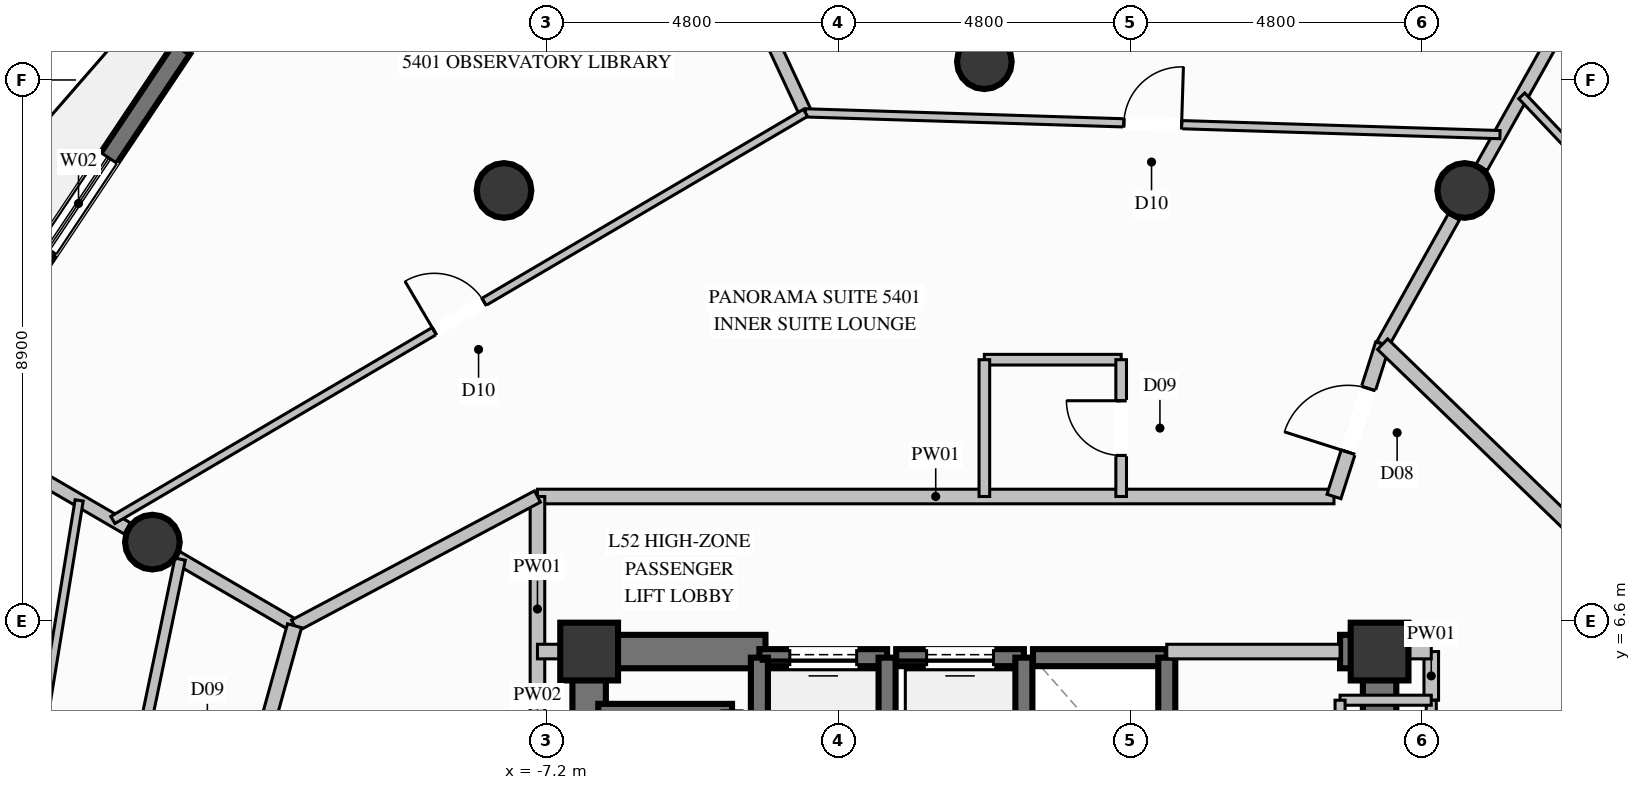
"""IFC4 building model, lengths in metres.
Left out: names, types, materials, properties, quantities, classifications, styles, units other than length and angle.
Written with IfcOpenShell. Run it as: python <this file> out.ifc"""

import sys

from ifc_helpers import new_model, si_unit, direction, frame, frame_2d, origin, origin_2d, place, context, subcontext, project, spatial, rectangle, circle, extrude, element, fill, save


model = new_model("IFC4")
c1 = context("Model", 3, precision=1e-05, world=origin(), true_north=direction((0.0, 1.0)))
c2 = subcontext(c1, "Body", "Model", "MODEL_VIEW")
j1 = project(units=[si_unit("LENGTHUNIT", "METRE"), si_unit("PLANEANGLEUNIT", "RADIAN")], contexts=[c1])
p1 = place(None, origin())
s1 = spatial("IfcSite", under=j1, at=p1, CompositionType="ELEMENT")
p2 = place(p1, origin())
s2 = spatial("IfcBuilding", under=s1, at=p2, CompositionType="ELEMENT")
p3 = place(p2, frame((0.0, 0.0, 202.0)))
s3 = spatial("IfcBuildingStorey", under=s2, at=p3, CompositionType="ELEMENT", Elevation=202.0)
for number, where, z_axis, x_axis in (
    (1, (6.5, 6.1, 0.0), (0.0, 0.0, 1.0), (1.0, 0.0, 0.0)),
    (2, (-6.5, 6.1, 0.0), (0.0, 0.0, 1.0), (1.0, 0.0, 0.0)),
):
    element("IfcColumn", number, at=place(p3, frame(where, z_axis=z_axis, x_axis=x_axis)), inside=s3, PredefinedType="COLUMN", context=c2, shape_type="SweptSolid", body=[
        extrude(rectangle(XDim=0.95, YDim=0.95, at=origin_2d()), origin(), (0.0, 0.0, 1.0), 3.6),
    ])
p4 = place(p3, frame((-6.225, 6.1, 0.0), z_axis=(0.0, 0.0, 1.0), x_axis=(1.0, 0.0, 0.0)))
e3 = element("IfcWall", 3, at=p4, inside=s3, PredefinedType="SHEAR", context=c2, shape_type="SweptSolid", body=[
    extrude(rectangle(XDim=2.625, YDim=0.55, at=frame_2d((1.312, 0.0))), origin(), (0.0, 0.0, 1.0), 3.6),
])
p5 = place(p3, frame((5.85, 6.1, 0.0), z_axis=(0.0, 0.0, 1.0), x_axis=(1.0, 0.0, 0.0)))
e4 = element("IfcWall", 4, at=p5, inside=s3, PredefinedType="SHEAR", context=c2, shape_type="SweptSolid", body=[
    extrude(rectangle(XDim=0.375, YDim=0.55, at=frame_2d((0.188, 0.0))), origin(), (0.0, 0.0, 1.0), 3.6),
])
p6 = place(p3, frame((-6.5, 2.35, 0.0), z_axis=(0.0, 0.0, 1.0), x_axis=(0.0, 1.0, 0.0)))
e5 = element("IfcWall", 5, at=p6, inside=s3, PredefinedType="SHEAR", context=c2, shape_type="SweptSolid", body=[
    extrude(rectangle(XDim=4.025, YDim=0.55, at=frame_2d((2.012, 0.0))), origin(), (0.0, 0.0, 1.0), 3.6),
])
p7 = place(p3, frame((6.5, 3.35, 0.0), z_axis=(0.0, 0.0, 1.0), x_axis=(0.0, 1.0, 0.0)))
e6 = element("IfcWall", 6, at=p7, inside=s3, PredefinedType="SHEAR", context=c2, shape_type="SweptSolid", body=[
    extrude(rectangle(XDim=3.025, YDim=0.55, at=frame_2d((1.512, 0.0))), origin(), (0.0, 0.0, 1.0), 3.6),
])
for number, where, z_axis, x_axis in (
    (7, (7.9, 13.683, 0.0), (0.0, 0.0, 1.0), (1.0, 0.0, 0.0)),
    (8, (0.0, 15.8, 0.0), (0.0, 0.0, 1.0), (1.0, 0.0, 0.0)),
    (9, (-7.9, 13.683, 0.0), (0.0, 0.0, 1.0), (1.0, 0.0, 0.0)),
    (10, (-13.683, 7.9, 0.0), (0.0, 0.0, 1.0), (1.0, 0.0, 0.0)),
):
    element("IfcColumn", number, at=place(p3, frame(where, z_axis=z_axis, x_axis=x_axis)), inside=s3, PredefinedType="COLUMN", context=c2, shape_type="SweptSolid", body=[
        extrude(circle(Radius=0.45, at=origin_2d()), origin(), (0.0, 0.0, 1.0), 3.6),
    ])
p8 = place(p3, frame((9.361, 18.229, 0.0), z_axis=(0.0, 0.0, 1.0), x_axis=(0.765961316102, -0.642886663601, 0.0)))
e11 = element("IfcWall", 11, at=p8, inside=s3, PredefinedType="SOLIDWALL", context=c2, shape_type="SweptSolid", body=[
    extrude(rectangle(XDim=6.637, YDim=0.32, at=frame_2d((3.319, 0.0))), origin(), (0.0, 0.0, 1.0), 3.36),
])
p9 = place(p8, frame((2.984, 0.0, 0.35)))
e12 = element("IfcOpeningElement", 12, at=p9, cuts=e11, PredefinedType="OPENING", context=c2, shape_type="SweptSolid", body=[
    extrude(rectangle(XDim=1.8, YDim=2.6, at=frame_2d((0.9, 1.3))), frame((0.0, 0.17, 0.0), z_axis=(0.0, -1.0, 0.0), x_axis=(1.0, 0.0, 0.0)), (0.0, 0.0, 1.0), 0.34),
])
p10 = place(p3, frame((-16.601, 10.92, 0.0), z_axis=(0.0, 0.0, 1.0), x_axis=(0.555517753524, 0.831504675585, 0.0)))
e13 = element("IfcWall", 13, at=p10, inside=s3, PredefinedType="SOLIDWALL", context=c2, shape_type="SweptSolid", body=[
    extrude(rectangle(XDim=6.131, YDim=0.32, at=frame_2d((3.066, 0.0))), origin(), (0.0, 0.0, 1.0), 3.36),
])
p11 = place(p10, frame((2.166, 0.0, 0.35)))
e14 = element("IfcOpeningElement", 14, at=p11, cuts=e13, PredefinedType="OPENING", context=c2, shape_type="SweptSolid", body=[
    extrude(rectangle(XDim=1.8, YDim=2.6, at=frame_2d((0.9, 1.3))), frame((0.0, 0.17, 0.0), z_axis=(0.0, -1.0, 0.0), x_axis=(1.0, 0.0, 0.0)), (0.0, 0.0, 1.0), 0.34),
])
p12 = place(p3, frame((-1.6, 6.0, 0.0), z_axis=(0.0, 0.0, 1.0), x_axis=(-1.0, 0.0, 0.0)))
e15 = element("IfcWall", 15, at=p12, inside=s3, PredefinedType="SOLIDWALL", context=c2, shape_type="SweptSolid", body=[
    extrude(rectangle(XDim=2.1, YDim=0.28, at=frame_2d((1.05, 0.0))), origin(), (0.0, 0.0, 1.0), 3.36),
])
p13 = place(p12, frame((0.5, 0.0, 0.0)))
e16 = element("IfcOpeningElement", 16, at=p13, cuts=e15, PredefinedType="OPENING", context=c2, shape_type="SweptSolid", body=[
    extrude(rectangle(XDim=1.1, YDim=2.2, at=frame_2d((0.55, 1.1))), frame((0.0, 0.15, 0.0), z_axis=(0.0, -1.0, 0.0), x_axis=(1.0, 0.0, 0.0)), (0.0, 0.0, 1.0), 0.3),
])
for number, where, z_axis, x_axis in (
    (17, (-3.7, 6.0, 0.0), (0.0, 0.0, 1.0), (0.0, -1.0, 0.0)),
    (18, (-1.6, 3.5, 0.0), (0.0, 0.0, 1.0), (0.0, 1.0, 0.0)),
):
    element("IfcWall", number, at=place(p3, frame(where, z_axis=z_axis, x_axis=x_axis)), inside=s3, PredefinedType="SOLIDWALL", context=c2, shape_type="SweptSolid", body=[
        extrude(rectangle(XDim=2.5, YDim=0.28, at=frame_2d((1.25, 0.0))), origin(), (0.0, 0.0, 1.0), 3.36),
    ])
p14 = place(p3, frame((0.65, 6.0, 0.0), z_axis=(0.0, 0.0, 1.0), x_axis=(-1.0, 0.0, 0.0)))
e19 = element("IfcWall", 19, at=p14, inside=s3, PredefinedType="SOLIDWALL", context=c2, shape_type="SweptSolid", body=[
    extrude(rectangle(XDim=2.1, YDim=0.28, at=frame_2d((1.05, 0.0))), origin(), (0.0, 0.0, 1.0), 3.36),
])
p15 = place(p14, frame((0.5, 0.0, 0.0)))
e20 = element("IfcOpeningElement", 20, at=p15, cuts=e19, PredefinedType="OPENING", context=c2, shape_type="SweptSolid", body=[
    extrude(rectangle(XDim=1.1, YDim=2.2, at=frame_2d((0.55, 1.1))), frame((0.0, 0.15, 0.0), z_axis=(0.0, -1.0, 0.0), x_axis=(1.0, 0.0, 0.0)), (0.0, 0.0, 1.0), 0.3),
])
p16 = place(p3, frame((0.65, 3.5, 0.0), z_axis=(0.0, 0.0, 1.0), x_axis=(0.0, 1.0, 0.0)))
e21 = element("IfcWall", 21, at=p16, inside=s3, PredefinedType="SOLIDWALL", context=c2, shape_type="SweptSolid", body=[
    extrude(rectangle(XDim=2.5, YDim=0.28, at=frame_2d((1.25, 0.0))), origin(), (0.0, 0.0, 1.0), 3.36),
])
p17 = place(p3, frame((3.0, 6.0, 0.0), z_axis=(0.0, 0.0, 1.0), x_axis=(-1.0, 0.0, 0.0)))
e22 = element("IfcWall", 22, at=p17, inside=s3, PredefinedType="SOLIDWALL", context=c2, shape_type="SweptSolid", body=[
    extrude(rectangle(XDim=2.2, YDim=0.28, at=frame_2d((1.1, 0.0))), origin(), (0.0, 0.0, 1.0), 3.36),
])
p18 = place(p3, frame((3.0, 3.5, 0.0), z_axis=(0.0, 0.0, 1.0), x_axis=(0.0, 1.0, 0.0)))
e23 = element("IfcWall", 23, at=p18, inside=s3, PredefinedType="SOLIDWALL", context=c2, shape_type="SweptSolid", body=[
    extrude(rectangle(XDim=2.5, YDim=0.28, at=frame_2d((1.25, 0.0))), origin(), (0.0, 0.0, 1.0), 3.36),
])
p19 = place(p3, frame((-4.15, 5.1, 0.0), z_axis=(0.0, 0.0, 1.0), x_axis=(-1.0, 0.0, 0.0)))
e24 = element("IfcWall", 24, at=p19, inside=s3, PredefinedType="SOLIDWALL", context=c2, shape_type="SweptSolid", body=[
    extrude(rectangle(XDim=2.2, YDim=0.28, at=frame_2d((1.1, 0.0))), origin(), (0.0, 0.0, 1.0), 3.36),
])
p20 = place(p3, frame((-7.35, 8.65, 0.0), z_axis=(0.0, 0.0, 1.0), x_axis=(1.0, 0.0, 0.0)))
e25 = element("IfcWall", 25, at=p20, inside=s3, PredefinedType="PARTITIONING", context=c2, shape_type="SweptSolid", body=[
    extrude(rectangle(XDim=13.1, YDim=0.24, at=frame_2d((6.55, 0.0))), origin(), (0.0, 0.0, 1.0), 3.36),
])
p21 = place(p3, frame((3.0, 6.1, 0.0), z_axis=(0.0, 0.0, 1.0), x_axis=(1.0, 0.0, 0.0)))
e26 = element("IfcWall", 26, at=p21, inside=s3, PredefinedType="PARTITIONING", context=c2, shape_type="SweptSolid", body=[
    extrude(rectangle(XDim=2.85, YDim=0.24, at=frame_2d((1.425, 0.0))), origin(), (0.0, 0.0, 1.0), 2.445),
])
p22 = place(p3, frame((7.35, 5.3, 0.0), z_axis=(0.0, 0.0, 1.0), x_axis=(0.0, 1.0, 0.0)))
e27 = element("IfcWall", 27, at=p22, inside=s3, PredefinedType="PARTITIONING", context=c2, shape_type="SweptSolid", body=[
    extrude(rectangle(XDim=0.8, YDim=0.24, at=frame_2d((0.4, 0.0))), origin(), (0.0, 0.0, 1.0), 2.445),
])
p23 = place(p3, frame((6.5, 6.1, 0.0), z_axis=(0.0, 0.0, 1.0), x_axis=(1.0, 0.0, 0.0)))
e28 = element("IfcWall", 28, at=p23, inside=s3, PredefinedType="PARTITIONING", context=c2, shape_type="SweptSolid", body=[
    extrude(rectangle(XDim=0.85, YDim=0.24, at=frame_2d((0.425, 0.0))), origin(), (0.0, 0.0, 1.0), 2.801),
])
p24 = place(p3, frame((-7.35, 4.95, 0.0), z_axis=(0.0, 0.0, 1.0), x_axis=(0.0, 1.0, 0.0)))
e29 = element("IfcWall", 29, at=p24, inside=s3, PredefinedType="PARTITIONING", context=c2, shape_type="SweptSolid", body=[
    extrude(rectangle(XDim=3.7, YDim=0.24, at=frame_2d((1.85, 0.0))), origin(), (0.0, 0.0, 1.0), 2.445),
])
p25 = place(p3, frame((-7.35, 6.1, 0.0), z_axis=(0.0, 0.0, 1.0), x_axis=(1.0, 0.0, 0.0)))
e30 = element("IfcWall", 30, at=p25, inside=s3, PredefinedType="PARTITIONING", context=c2, shape_type="SweptSolid", body=[
    extrude(rectangle(XDim=0.85, YDim=0.24, at=frame_2d((0.425, 0.0))), origin(), (0.0, 0.0, 1.0), 2.801),
])
p26 = place(p3, frame((7.35, 2.75, 0.0), z_axis=(0.0, 0.0, 1.0), x_axis=(0.0, 1.0, 0.0)))
e31 = element("IfcWall", 31, at=p26, inside=s3, PredefinedType="PARTITIONING", context=c2, shape_type="SweptSolid", body=[
    extrude(rectangle(XDim=2.55, YDim=0.165, at=frame_2d((1.275, 0.0))), origin(), (0.0, 0.0, 1.0), 3.36),
])
p27 = place(p26, frame((0.75, 0.0, 0.0)))
e32 = element("IfcOpeningElement", 32, at=p27, cuts=e31, PredefinedType="OPENING", context=c2, shape_type="SweptSolid", body=[
    extrude(rectangle(XDim=1.05, YDim=2.15, at=frame_2d((0.525, 1.075))), frame((0.0, 0.093, 0.0), z_axis=(0.0, -1.0, 0.0), x_axis=(1.0, 0.0, 0.0)), (0.0, 0.0, 1.0), 0.185),
])
p28 = place(p3, frame((7.35, 5.3, 0.0), z_axis=(0.0, 0.0, 1.0), x_axis=(-1.0, 0.0, 0.0)))
e33 = element("IfcWall", 33, at=p28, inside=s3, PredefinedType="PARTITIONING", context=c2, shape_type="SweptSolid", body=[
    extrude(rectangle(XDim=1.5, YDim=0.165, at=frame_2d((0.75, 0.0))), origin(), (0.0, 0.0, 1.0), 2.445),
])
p29 = place(p3, frame((5.85, 5.3, 0.0), z_axis=(0.0, 0.0, 1.0), x_axis=(0.0, -1.0, 0.0)))
e34 = element("IfcWall", 34, at=p29, inside=s3, PredefinedType="PARTITIONING", context=c2, shape_type="SweptSolid", body=[
    extrude(rectangle(XDim=2.55, YDim=0.165, at=frame_2d((1.275, 0.0))), origin(), (0.0, 0.0, 1.0), 2.445),
])
p30 = place(p3, frame((6.55, 11.155, 0.0), z_axis=(0.0, 0.0, 1.0), x_axis=(0.488535184748, 0.872544195593, 0.0)))
e35 = element("IfcWall", 35, at=p30, inside=s3, PredefinedType="PARTITIONING", context=c2, shape_type="SweptSolid", body=[
    extrude(rectangle(XDim=2.399, YDim=0.21, at=frame_2d((1.199, 0.0))), origin(), (0.0, 0.0, 1.0), 2.801),
])
p31 = place(p3, frame((8.178, 14.062, 0.0), z_axis=(0.0, 0.0, 1.0), x_axis=(0.488788123952, 0.87240252744, 0.0)))
e36 = element("IfcWall", 36, at=p31, inside=s3, PredefinedType="PARTITIONING", context=c2, shape_type="SweptSolid", body=[
    extrude(rectangle(XDim=3.983, YDim=0.21, at=frame_2d((1.992, 0.0))), origin(), (0.0, 0.0, 1.0), 3.36),
])
p32 = place(p3, frame((-11.345, 6.525, 0.0), z_axis=(0.0, 0.0, 1.0), x_axis=(-0.864228712324, 0.5030991282, 0.0)))
e37 = element("IfcWall", 37, at=p32, inside=s3, PredefinedType="PARTITIONING", context=c2, shape_type="SweptSolid", body=[
    extrude(rectangle(XDim=2.242, YDim=0.21, at=frame_2d((1.121, 0.0))), origin(), (0.0, 0.0, 1.0), 2.801),
])
p33 = place(p3, frame((-14.095, 8.125, 0.0), z_axis=(0.0, 0.0, 1.0), x_axis=(-0.864298015092, 0.502980060348, 0.0)))
e38 = element("IfcWall", 38, at=p33, inside=s3, PredefinedType="PARTITIONING", context=c2, shape_type="SweptSolid", body=[
    extrude(rectangle(XDim=3.221, YDim=0.21, at=frame_2d((1.61, 0.0))), origin(), (0.0, 0.0, 1.0), 3.36),
])
for number, where, z_axis, x_axis in (
    (39, (0.0, 10.9, 0.0), (0.0, 0.0, 1.0), (1.0, 0.0, 0.0)),
    (40, (0.0, 10.9, 0.0), (0.0, 0.0, 1.0), (0.0, -1.0, 0.0)),
):
    element("IfcWall", number, at=place(p3, frame(where, z_axis=z_axis, x_axis=x_axis)), inside=s3, PredefinedType="PLUMBINGWALL", context=c2, shape_type="SweptSolid", body=[
        extrude(rectangle(XDim=2.25, YDim=0.175, at=frame_2d((1.125, 0.0))), origin(), (0.0, 0.0, 1.0), 3.36),
    ])
p34 = place(p3, frame((2.25, 8.65, 0.0), z_axis=(0.0, 0.0, 1.0), x_axis=(0.0, 1.0, 0.0)))
e41 = element("IfcWall", 41, at=p34, inside=s3, PredefinedType="PLUMBINGWALL", context=c2, shape_type="SweptSolid", body=[
    extrude(rectangle(XDim=2.25, YDim=0.175, at=frame_2d((1.125, 0.0))), origin(), (0.0, 0.0, 1.0), 3.36),
])
p35 = place(p34, frame((0.675, 0.0, 0.0)))
e42 = element("IfcOpeningElement", 42, at=p35, cuts=e41, PredefinedType="OPENING", context=c2, shape_type="SweptSolid", body=[
    extrude(rectangle(XDim=0.9, YDim=2.1, at=frame_2d((0.45, 1.05))), frame((0.0, 0.098, 0.0), z_axis=(0.0, -1.0, 0.0), x_axis=(1.0, 0.0, 0.0)), (0.0, 0.0, 1.0), 0.195),
])
p36 = place(p3, frame((-11.345, 6.525, 0.0), z_axis=(0.0, 0.0, 1.0), x_axis=(0.882866201619, 0.469624605445, 0.0)))
e43 = element("IfcWall", 43, at=p36, inside=s3, PredefinedType="PARTITIONING", context=c2, shape_type="SweptSolid", body=[
    extrude(rectangle(XDim=4.525, YDim=0.21, at=frame_2d((2.262, 0.0))), origin(), (0.0, 0.0, 1.0), 3.36),
])
p37 = place(p3, frame((5.75, 8.65, 0.0), z_axis=(0.0, 0.0, 1.0), x_axis=(0.304226604656, 0.952599691906, 0.0)))
e44 = element("IfcWall", 44, at=p37, inside=s3, PredefinedType="PARTITIONING", context=c2, shape_type="SweptSolid", body=[
    extrude(rectangle(XDim=2.63, YDim=0.24, at=frame_2d((1.315, 0.0))), origin(), (0.0, 0.0, 1.0), 3.36),
])
p38 = place(p37, frame((0.765, 0.0, 0.0)))
e45 = element("IfcOpeningElement", 45, at=p38, cuts=e44, PredefinedType="OPENING", context=c2, shape_type="SweptSolid", body=[
    extrude(rectangle(XDim=1.1, YDim=2.3, at=frame_2d((0.55, 1.15))), frame((0.0, 0.13, 0.0), z_axis=(0.0, -1.0, 0.0), x_axis=(1.0, 0.0, 0.0)), (0.0, 0.0, 1.0), 0.26),
])
p39 = place(p3, frame((-2.942, 14.959, 0.0), z_axis=(0.0, 0.0, 1.0), x_axis=(-0.422711938281, 0.906264099054, 0.0)))
e46 = element("IfcWall", 46, at=p39, inside=s3, PredefinedType="PARTITIONING", context=c2, shape_type="SweptSolid", body=[
    extrude(rectangle(XDim=5.931, YDim=0.21, at=frame_2d((2.965, 0.0))), origin(), (0.0, 0.0, 1.0), 3.36),
])
p40 = place(p3, frame((-2.942, 14.959, 0.0), z_axis=(0.0, 0.0, 1.0), x_axis=(0.999509404504, -0.031320126261, 0.0)))
e47 = element("IfcWall", 47, at=p40, inside=s3, PredefinedType="PARTITIONING", context=c2, shape_type="SweptSolid", body=[
    extrude(rectangle(XDim=11.427, YDim=0.135, at=frame_2d((5.714, 0.0))), origin(), (0.0, 0.0, 1.0), 2.929),
])
p41 = place(p40, frame((5.239, 0.0, 0.0)))
e48 = element("IfcOpeningElement", 48, at=p41, cuts=e47, PredefinedType="OPENING", context=c2, shape_type="SweptSolid", body=[
    extrude(rectangle(XDim=0.95, YDim=2.1, at=frame_2d((0.475, 1.05))), frame((0.0, 0.078, 0.0), z_axis=(0.0, -1.0, 0.0), x_axis=(1.0, 0.0, 0.0)), (0.0, 0.0, 1.0), 0.155),
])
p42 = place(p3, frame((-14.333, 8.264, 0.0), z_axis=(0.0, 0.0, 1.0), x_axis=(0.862118932007, 0.506705976948, 0.0)))
e49 = element("IfcWall", 49, at=p42, inside=s3, PredefinedType="PARTITIONING", context=c2, shape_type="SweptSolid", body=[
    extrude(rectangle(XDim=13.213, YDim=0.135, at=frame_2d((6.606, 0.0))), origin(), (0.0, 0.0, 1.0), 2.929),
])
p43 = place(p42, frame((6.131, 0.0, 0.0)))
e50 = element("IfcOpeningElement", 50, at=p43, cuts=e49, PredefinedType="OPENING", context=c2, shape_type="SweptSolid", body=[
    extrude(rectangle(XDim=0.95, YDim=2.1, at=frame_2d((0.475, 1.05))), frame((0.0, 0.078, 0.0), z_axis=(0.0, -1.0, 0.0), x_axis=(1.0, 0.0, 0.0)), (0.0, 0.0, 1.0), 0.155),
])
p44 = place(p3, frame((-11.345, 6.525, 0.0), z_axis=(0.0, 0.0, 1.0), x_axis=(-0.267401739017, -0.963585133743, 0.0)))
e51 = element("IfcWall", 51, at=p44, inside=s3, PredefinedType="PARTITIONING", context=c2, shape_type="SweptSolid", body=[
    extrude(rectangle(XDim=2.756, YDim=0.24, at=frame_2d((1.378, 0.0))), origin(), (0.0, 0.0, 1.0), 3.36),
])
p45 = place(p3, frame((-13.227, 7.62, 0.0), z_axis=(0.0, 0.0, 1.0), x_axis=(-0.203899627086, -0.978991798778, 0.0)))
e52 = element("IfcWall", 52, at=p45, inside=s3, PredefinedType="PLUMBINGWALL", context=c2, shape_type="SweptSolid", body=[
    extrude(rectangle(XDim=3.212, YDim=0.175, at=frame_2d((1.606, 0.0))), origin(), (0.0, 0.0, 1.0), 2.929),
])
p46 = place(p3, frame((-14.887, 8.586, 0.0), z_axis=(0.0, 0.0, 1.0), x_axis=(-0.16114427543, -0.986930860038, 0.0)))
e53 = element("IfcWall", 53, at=p46, inside=s3, PredefinedType="PARTITIONING", context=c2, shape_type="SweptSolid", body=[
    extrude(rectangle(XDim=8.627, YDim=0.135, at=frame_2d((4.313, 0.0))), origin(), (0.0, 0.0, 1.0), 2.929),
])
p47 = place(p46, frame((3.838, 0.0, 0.0)))
e54 = element("IfcOpeningElement", 54, at=p47, cuts=e53, PredefinedType="OPENING", context=c2, shape_type="SweptSolid", body=[
    extrude(rectangle(XDim=0.95, YDim=2.1, at=frame_2d((0.475, 1.05))), frame((0.0, 0.078, 0.0), z_axis=(0.0, -1.0, 0.0), x_axis=(1.0, 0.0, 0.0)), (0.0, 0.0, 1.0), 0.155),
])
p48 = place(p3, frame((11.345, 6.525, 0.0), z_axis=(0.0, 0.0, 1.0), x_axis=(-0.719360436772, 0.694637000172, 0.0)))
e55 = element("IfcWall", 55, at=p48, inside=s3, PredefinedType="PARTITIONING", context=c2, shape_type="SweptSolid", body=[
    extrude(rectangle(XDim=6.666, YDim=0.24, at=frame_2d((3.333, 0.0))), origin(), (0.0, 0.0, 1.0), 3.36),
])
p49 = place(p3, frame((15.048, 8.679, 0.0), z_axis=(0.0, 0.0, 1.0), x_axis=(-0.687476978128, 0.726206172202, 0.0)))
e56 = element("IfcWall", 56, at=p49, inside=s3, PredefinedType="PARTITIONING", context=c2, shape_type="SweptSolid", body=[
    extrude(rectangle(XDim=9.033, YDim=0.135, at=frame_2d((4.517, 0.0))), origin(), (0.0, 0.0, 1.0), 3.36),
])
p50 = place(p49, frame((4.042, 0.0, 0.0)))
e57 = element("IfcOpeningElement", 57, at=p50, cuts=e56, PredefinedType="OPENING", context=c2, shape_type="SweptSolid", body=[
    extrude(rectangle(XDim=0.95, YDim=2.1, at=frame_2d((0.475, 1.05))), frame((0.0, 0.078, 0.0), z_axis=(0.0, -1.0, 0.0), x_axis=(1.0, 0.0, 0.0)), (0.0, 0.0, 1.0), 0.155),
])
p51 = place(p11, origin())
e58 = element("IfcWindow", 58, at=p51, inside=s3, PartitioningType="SINGLE_PANEL", PredefinedType="WINDOW", context=c2, shape_type="SweptSolid", body=[
    extrude(rectangle(XDim=1.8, YDim=2.6, at=frame_2d((0.9, 1.3))), frame((0.0, 0.03, 0.0), z_axis=(0.0, -1.0, 0.0), x_axis=(1.0, 0.0, 0.0)), (0.0, 0.0, 1.0), 0.06),
])
fill(e14, e58)
p52 = place(p13, origin())
e59 = element("IfcDoor", 59, at=p52, inside=s3, OperationType="SLIDING_TO_LEFT", PredefinedType="DOOR", context=c2, shape_type="SweptSolid", body=[
    extrude(rectangle(XDim=1.1, YDim=2.2, at=frame_2d((0.55, 1.1))), frame((0.0, 0.025, 0.0), z_axis=(0.0, -1.0, 0.0), x_axis=(1.0, 0.0, 0.0)), (0.0, 0.0, 1.0), 0.05),
])
fill(e16, e59)
p53 = place(p15, origin())
e60 = element("IfcDoor", 60, at=p53, inside=s3, OperationType="SLIDING_TO_LEFT", PredefinedType="DOOR", context=c2, shape_type="SweptSolid", body=[
    extrude(rectangle(XDim=1.1, YDim=2.2, at=frame_2d((0.55, 1.1))), frame((0.0, 0.025, 0.0), z_axis=(0.0, -1.0, 0.0), x_axis=(1.0, 0.0, 0.0)), (0.0, 0.0, 1.0), 0.05),
])
fill(e20, e60)
p54 = place(p35, origin())
e61 = element("IfcDoor", 61, at=p54, inside=s3, OperationType="SINGLE_SWING_RIGHT", PredefinedType="DOOR", context=c2, shape_type="SweptSolid", body=[
    extrude(rectangle(XDim=0.9, YDim=2.1, at=frame_2d((0.45, 1.05))), frame((0.0, 0.025, 0.0), z_axis=(0.0, -1.0, 0.0), x_axis=(1.0, 0.0, 0.0)), (0.0, 0.0, 1.0), 0.05),
])
fill(e42, e61)
p55 = place(p38, origin())
e62 = element("IfcDoor", 62, at=p55, inside=s3, OperationType="SINGLE_SWING_LEFT", PredefinedType="DOOR", context=c2, shape_type="SweptSolid", body=[
    extrude(rectangle(XDim=1.1, YDim=2.3, at=frame_2d((0.55, 1.15))), frame((0.0, 0.025, 0.0), z_axis=(0.0, -1.0, 0.0), x_axis=(1.0, 0.0, 0.0)), (0.0, 0.0, 1.0), 0.05),
])
fill(e45, e62)
p56 = place(p41, origin())
e63 = element("IfcDoor", 63, at=p56, inside=s3, OperationType="SINGLE_SWING_RIGHT", PredefinedType="DOOR", context=c2, shape_type="SweptSolid", body=[
    extrude(rectangle(XDim=0.95, YDim=2.1, at=frame_2d((0.475, 1.05))), frame((0.0, 0.025, 0.0), z_axis=(0.0, -1.0, 0.0), x_axis=(1.0, 0.0, 0.0)), (0.0, 0.0, 1.0), 0.05),
])
fill(e48, e63)
p57 = place(p43, origin())
e64 = element("IfcDoor", 64, at=p57, inside=s3, OperationType="SINGLE_SWING_LEFT", PredefinedType="DOOR", context=c2, shape_type="SweptSolid", body=[
    extrude(rectangle(XDim=0.95, YDim=2.1, at=frame_2d((0.475, 1.05))), frame((0.0, 0.025, 0.0), z_axis=(0.0, -1.0, 0.0), x_axis=(1.0, 0.0, 0.0)), (0.0, 0.0, 1.0), 0.05),
])
fill(e50, e64)
save(model, sys.argv[1])
